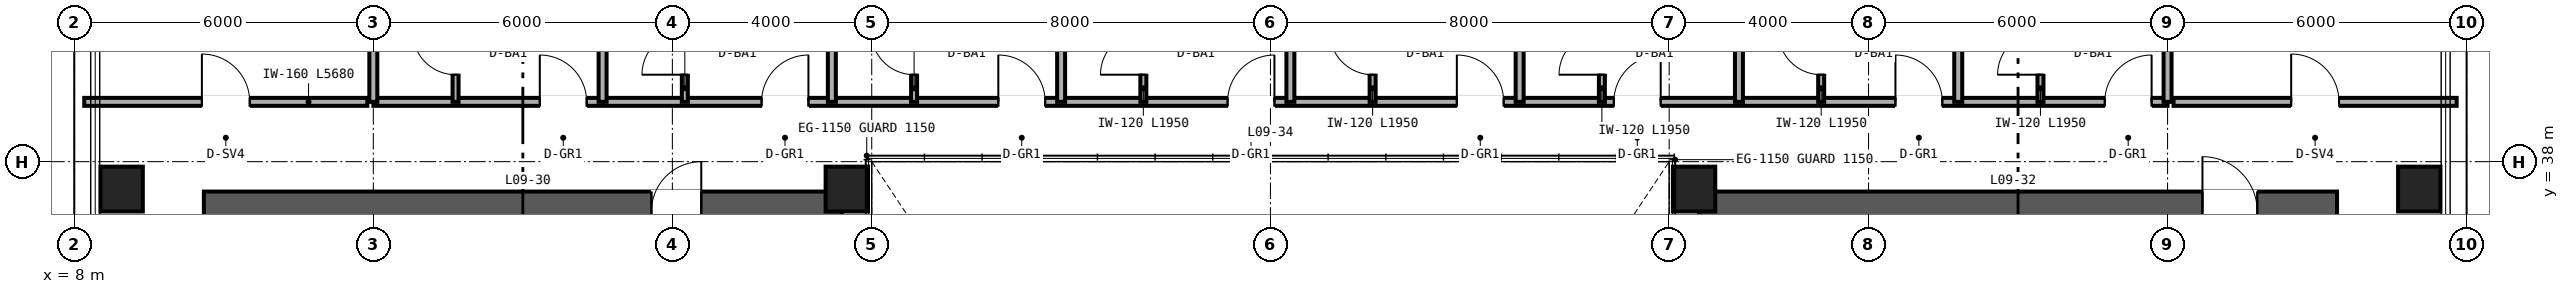
"""IFC4 building model, lengths in metres.
Left out: names, types, materials, properties, quantities, classifications, styles, units other than length and angle.
Written with IfcOpenShell. Run it as: python <this file> out.ifc"""

import sys

from ifc_helpers import new_model, si_unit, direction, frame, frame_2d, origin, origin_2d, place, context, subcontext, project, spatial, rectangle, hollow_rectangle, extrude, source, transform, mapped, element, fill, save


model = new_model("IFC4")
c1 = context("Model", 3, precision=1e-05, world=origin(), true_north=direction((0.0, 1.0)))
c2 = subcontext(c1, "Body", "Model", "MODEL_VIEW")
j1 = project(units=[si_unit("LENGTHUNIT", "METRE"), si_unit("PLANEANGLEUNIT", "RADIAN")], contexts=[c1])
p1 = place(None, origin())
s1 = spatial("IfcSite", under=j1, at=p1, CompositionType="ELEMENT")
p2 = place(p1, origin())
s2 = spatial("IfcBuilding", under=s1, at=p2, CompositionType="ELEMENT")
p3 = place(p2, frame((0.0, 0.0, 42.0)))
s3 = spatial("IfcBuildingStorey", under=s2, at=p3, CompositionType="ELEMENT", Elevation=42.0)
p4 = place(p3, frame((10.6, 37.0, 0.0), z_axis=(0.0, 0.0, 1.0), x_axis=(1.0, 0.0, 0.0)))
e1 = element("IfcWall", 1, at=p4, inside=s3, PredefinedType="SHEAR", context=c2, shape_type="SweptSolid", body=[
    extrude(rectangle(XDim=12.8, YDim=0.8, at=frame_2d((6.4, 0.0))), origin(), (0.0, 0.0, 1.0), 3.35),
])
p5 = place(p4, frame((8.98, 0.0, 0.0)))
e2 = element("IfcOpeningElement", 2, at=p5, cuts=e1, PredefinedType="OPENING", context=c2, shape_type="SweptSolid", body=[
    extrude(rectangle(XDim=1.0, YDim=2.15, at=frame_2d((0.5, 1.075))), frame((0.0, 0.41, 0.0), z_axis=(0.0, -1.0, 0.0), x_axis=(1.0, 0.0, 0.0)), (0.0, 0.0, 1.0), 0.82),
])
p6 = place(p3, frame((40.6, 37.0, 0.0), z_axis=(0.0, 0.0, 1.0), x_axis=(1.0, 0.0, 0.0)))
e3 = element("IfcWall", 3, at=p6, inside=s3, PredefinedType="SHEAR", context=c2, shape_type="SweptSolid", body=[
    extrude(rectangle(XDim=12.8, YDim=0.8, at=frame_2d((6.4, 0.0))), origin(), (0.0, 0.0, 1.0), 3.35),
])
p7 = place(p6, frame((10.1, 0.0, 0.0)))
e4 = element("IfcOpeningElement", 4, at=p7, cuts=e3, PredefinedType="OPENING", context=c2, shape_type="SweptSolid", body=[
    extrude(rectangle(XDim=1.1, YDim=2.15, at=frame_2d((0.55, 1.075))), frame((0.0, 0.41, 0.0), z_axis=(0.0, -1.0, 0.0), x_axis=(1.0, 0.0, 0.0)), (0.0, 0.0, 1.0), 0.82),
])
m1 = source(origin(), c2, "Body", "SweptSolid", [
    extrude(hollow_rectangle(XDim=0.85, YDim=0.9, WallThickness=0.04, at=origin_2d()), origin(), (0.0, 0.0, 1.0), 3.35),
])
for number, where, z_axis, x_axis in (
    (5, (8.95, 37.45, 0.0), (0.0, 0.0, 1.0), (1.0, 0.0, 0.0)),
    (6, (23.5, 37.45, 0.0), (0.0, 0.0, 1.0), (1.0, 0.0, 0.0)),
    (7, (40.5, 37.45, 0.0), (0.0, 0.0, 1.0), (1.0, 0.0, 0.0)),
    (8, (55.05, 37.45, 0.0), (0.0, 0.0, 1.0), (1.0, 0.0, 0.0)),
):
    element("IfcColumn", number, at=place(p3, frame(where, z_axis=z_axis, x_axis=x_axis)), inside=s3, PredefinedType="COLUMN", context=c2, shape_type="MappedRepresentation", body=[
        mapped(m1, transform((0.0, 0.0, 0.0), scale=1.0)),
    ])
p8 = place(p3, frame((8.2, 39.2, 0.0), z_axis=(0.0, 0.0, 1.0), x_axis=(1.0, 0.0, 0.0)))
e9 = element("IfcWall", 9, at=p8, inside=s3, PredefinedType="PARTITIONING", context=c2, shape_type="SweptSolid", body=[
    extrude(rectangle(XDim=5.68, YDim=0.16, at=frame_2d((2.84, 0.0))), origin(), (0.0, 0.0, 1.0), 3.35),
])
p9 = place(p8, frame((2.36, 0.0, 0.0)))
e10 = element("IfcOpeningElement", 10, at=p9, cuts=e9, PredefinedType="OPENING", context=c2, shape_type="SweptSolid", body=[
    extrude(rectangle(XDim=0.96, YDim=2.15, at=frame_2d((0.48, 1.075))), frame((0.0, 0.09, 0.0), z_axis=(0.0, -1.0, 0.0), x_axis=(1.0, 0.0, 0.0)), (0.0, 0.0, 1.0), 0.18),
])
p10 = place(p3, frame((50.12, 39.2, 0.0), z_axis=(0.0, 0.0, 1.0), x_axis=(1.0, 0.0, 0.0)))
e11 = element("IfcWall", 11, at=p10, inside=s3, PredefinedType="PARTITIONING", context=c2, shape_type="SweptSolid", body=[
    extrude(rectangle(XDim=5.68, YDim=0.16, at=frame_2d((2.84, 0.0))), origin(), (0.0, 0.0, 1.0), 3.35),
])
p11 = place(p10, frame((2.36, 0.0, 0.0)))
e12 = element("IfcOpeningElement", 12, at=p11, cuts=e11, PredefinedType="OPENING", context=c2, shape_type="SweptSolid", body=[
    extrude(rectangle(XDim=0.96, YDim=2.15, at=frame_2d((0.48, 1.075))), frame((0.0, 0.09, 0.0), z_axis=(0.0, -1.0, 0.0), x_axis=(1.0, 0.0, 0.0)), (0.0, 0.0, 1.0), 0.18),
])
p12 = place(p3, frame((14.0, 39.2, 0.0), z_axis=(0.0, 0.0, 1.0), x_axis=(1.0, 0.0, 0.0)))
e13 = element("IfcWall", 13, at=p12, inside=s3, PredefinedType="PARTITIONING", context=c2, shape_type="SweptSolid", body=[
    extrude(rectangle(XDim=36.0, YDim=0.16, at=frame_2d((18.0, 0.0))), origin(), (0.0, 0.0, 1.0), 2.571),
])
p13 = place(p12, frame((3.34, 0.0, 0.0)))
e14 = element("IfcOpeningElement", 14, at=p13, cuts=e13, PredefinedType="OPENING", context=c2, shape_type="SweptSolid", body=[
    extrude(rectangle(XDim=0.94, YDim=2.15, at=frame_2d((0.47, 1.075))), frame((0.0, 0.09, 0.0), z_axis=(0.0, -1.0, 0.0), x_axis=(1.0, 0.0, 0.0)), (0.0, 0.0, 1.0), 0.18),
])
p14 = place(p12, frame((7.79, 0.0, 0.0)))
e15 = element("IfcOpeningElement", 15, at=p14, cuts=e13, PredefinedType="OPENING", context=c2, shape_type="SweptSolid", body=[
    extrude(rectangle(XDim=0.94, YDim=2.15, at=frame_2d((0.47, 1.075))), frame((0.0, 0.09, 0.0), z_axis=(0.0, -1.0, 0.0), x_axis=(1.0, 0.0, 0.0)), (0.0, 0.0, 1.0), 0.18),
])
p15 = place(p12, frame((12.54, 0.0, 0.0)))
e16 = element("IfcOpeningElement", 16, at=p15, cuts=e13, PredefinedType="OPENING", context=c2, shape_type="SweptSolid", body=[
    extrude(rectangle(XDim=0.94, YDim=2.15, at=frame_2d((0.47, 1.075))), frame((0.0, 0.09, 0.0), z_axis=(0.0, -1.0, 0.0), x_axis=(1.0, 0.0, 0.0)), (0.0, 0.0, 1.0), 0.18),
])
p16 = place(p12, frame((17.14, 0.0, 0.0)))
e17 = element("IfcOpeningElement", 17, at=p16, cuts=e13, PredefinedType="OPENING", context=c2, shape_type="SweptSolid", body=[
    extrude(rectangle(XDim=0.94, YDim=2.15, at=frame_2d((0.47, 1.075))), frame((0.0, 0.09, 0.0), z_axis=(0.0, -1.0, 0.0), x_axis=(1.0, 0.0, 0.0)), (0.0, 0.0, 1.0), 0.18),
])
p17 = place(p12, frame((21.74, 0.0, 0.0)))
e18 = element("IfcOpeningElement", 18, at=p17, cuts=e13, PredefinedType="OPENING", context=c2, shape_type="SweptSolid", body=[
    extrude(rectangle(XDim=0.94, YDim=2.15, at=frame_2d((0.47, 1.075))), frame((0.0, 0.09, 0.0), z_axis=(0.0, -1.0, 0.0), x_axis=(1.0, 0.0, 0.0)), (0.0, 0.0, 1.0), 0.18),
])
p18 = place(p12, frame((24.89, 0.0, 0.0)))
e19 = element("IfcOpeningElement", 19, at=p18, cuts=e13, PredefinedType="OPENING", context=c2, shape_type="SweptSolid", body=[
    extrude(rectangle(XDim=0.94, YDim=2.15, at=frame_2d((0.47, 1.075))), frame((0.0, 0.09, 0.0), z_axis=(0.0, -1.0, 0.0), x_axis=(1.0, 0.0, 0.0)), (0.0, 0.0, 1.0), 0.18),
])
p19 = place(p12, frame((30.54, 0.0, 0.0)))
e20 = element("IfcOpeningElement", 20, at=p19, cuts=e13, PredefinedType="OPENING", context=c2, shape_type="SweptSolid", body=[
    extrude(rectangle(XDim=0.94, YDim=2.15, at=frame_2d((0.47, 1.075))), frame((0.0, 0.09, 0.0), z_axis=(0.0, -1.0, 0.0), x_axis=(1.0, 0.0, 0.0)), (0.0, 0.0, 1.0), 0.18),
])
p20 = place(p12, frame((34.74, 0.0, 0.0)))
e21 = element("IfcOpeningElement", 21, at=p20, cuts=e13, PredefinedType="OPENING", context=c2, shape_type="SweptSolid", body=[
    extrude(rectangle(XDim=0.94, YDim=2.15, at=frame_2d((0.47, 1.075))), frame((0.0, 0.09, 0.0), z_axis=(0.0, -1.0, 0.0), x_axis=(1.0, 0.0, 0.0)), (0.0, 0.0, 1.0), 0.18),
])
for number, where, z_axis, x_axis in (
    (22, (14.0, 39.2, 0.0), (0.0, 0.0, 1.0), (0.0, 1.0, 0.0)),
    (23, (50.0, 39.2, 0.0), (0.0, 0.0, 1.0), (0.0, 1.0, 0.0)),
    (24, (18.6, 39.2, 0.0), (0.0, 0.0, 1.0), (0.0, 1.0, 0.0)),
):
    element("IfcWall", number, at=place(p3, frame(where, z_axis=z_axis, x_axis=x_axis)), inside=s3, PredefinedType="PARTITIONING", context=c2, shape_type="SweptSolid", body=[
        extrude(rectangle(XDim=10.44, YDim=0.16, at=frame_2d((5.22, 0.0))), origin(), (0.0, 0.0, 1.0), 2.657),
    ])
p21 = place(p3, frame((15.65, 39.2, 0.0), z_axis=(0.0, 0.0, 1.0), x_axis=(0.0, 1.0, 0.0)))
e25 = element("IfcWall", 25, at=p21, inside=s3, PredefinedType="PARTITIONING", context=c2, shape_type="SweptSolid", body=[
    extrude(rectangle(XDim=1.95, YDim=0.12, at=frame_2d((0.975, 0.0))), origin(), (0.0, 0.0, 1.0), 3.35),
])
p22 = place(p21, frame((0.545, 0.0, 0.0)))
e26 = element("IfcOpeningElement", 26, at=p22, cuts=e25, PredefinedType="OPENING", context=c2, shape_type="SweptSolid", body=[
    extrude(rectangle(XDim=0.86, YDim=2.1, at=frame_2d((0.43, 1.05))), frame((0.0, 0.07, 0.0), z_axis=(0.0, -1.0, 0.0), x_axis=(1.0, 0.0, 0.0)), (0.0, 0.0, 1.0), 0.14),
])
p23 = place(p3, frame((23.2, 39.2, 0.0), z_axis=(0.0, 0.0, 1.0), x_axis=(0.0, 1.0, 0.0)))
e27 = element("IfcWall", 27, at=p23, inside=s3, PredefinedType="PARTITIONING", context=c2, shape_type="SweptSolid", body=[
    extrude(rectangle(XDim=10.44, YDim=0.16, at=frame_2d((5.22, 0.0))), origin(), (0.0, 0.0, 1.0), 2.813),
])
p24 = place(p3, frame((20.25, 39.2, 0.0), z_axis=(0.0, 0.0, 1.0), x_axis=(0.0, 1.0, 0.0)))
e28 = element("IfcWall", 28, at=p24, inside=s3, PredefinedType="PARTITIONING", context=c2, shape_type="SweptSolid", body=[
    extrude(rectangle(XDim=1.95, YDim=0.12, at=frame_2d((0.975, 0.0))), origin(), (0.0, 0.0, 1.0), 3.35),
])
p25 = place(p24, frame((0.545, 0.0, 0.0)))
e29 = element("IfcOpeningElement", 29, at=p25, cuts=e28, PredefinedType="OPENING", context=c2, shape_type="SweptSolid", body=[
    extrude(rectangle(XDim=0.86, YDim=2.1, at=frame_2d((0.43, 1.05))), frame((0.0, 0.07, 0.0), z_axis=(0.0, -1.0, 0.0), x_axis=(1.0, 0.0, 0.0)), (0.0, 0.0, 1.0), 0.14),
])
p26 = place(p3, frame((27.8, 39.2, 0.0), z_axis=(0.0, 0.0, 1.0), x_axis=(0.0, 1.0, 0.0)))
e30 = element("IfcWall", 30, at=p26, inside=s3, PredefinedType="PARTITIONING", context=c2, shape_type="SweptSolid", body=[
    extrude(rectangle(XDim=10.44, YDim=0.16, at=frame_2d((5.22, 0.0))), origin(), (0.0, 0.0, 1.0), 2.423),
])
p27 = place(p3, frame((24.85, 39.2, 0.0), z_axis=(0.0, 0.0, 1.0), x_axis=(0.0, 1.0, 0.0)))
e31 = element("IfcWall", 31, at=p27, inside=s3, PredefinedType="PARTITIONING", context=c2, shape_type="SweptSolid", body=[
    extrude(rectangle(XDim=1.95, YDim=0.12, at=frame_2d((0.975, 0.0))), origin(), (0.0, 0.0, 1.0), 3.35),
])
p28 = place(p27, frame((0.545, 0.0, 0.0)))
e32 = element("IfcOpeningElement", 32, at=p28, cuts=e31, PredefinedType="OPENING", context=c2, shape_type="SweptSolid", body=[
    extrude(rectangle(XDim=0.86, YDim=2.1, at=frame_2d((0.43, 1.05))), frame((0.0, 0.07, 0.0), z_axis=(0.0, -1.0, 0.0), x_axis=(1.0, 0.0, 0.0)), (0.0, 0.0, 1.0), 0.14),
])
p29 = place(p3, frame((32.4, 39.2, 0.0), z_axis=(0.0, 0.0, 1.0), x_axis=(0.0, 1.0, 0.0)))
e33 = element("IfcWall", 33, at=p29, inside=s3, PredefinedType="PARTITIONING", context=c2, shape_type="SweptSolid", body=[
    extrude(rectangle(XDim=10.44, YDim=0.16, at=frame_2d((5.22, 0.0))), origin(), (0.0, 0.0, 1.0), 2.423),
])
p30 = place(p3, frame((29.45, 39.2, 0.0), z_axis=(0.0, 0.0, 1.0), x_axis=(0.0, 1.0, 0.0)))
e34 = element("IfcWall", 34, at=p30, inside=s3, PredefinedType="PARTITIONING", context=c2, shape_type="SweptSolid", body=[
    extrude(rectangle(XDim=1.95, YDim=0.12, at=frame_2d((0.975, 0.0))), origin(), (0.0, 0.0, 1.0), 3.35),
])
p31 = place(p30, frame((0.545, 0.0, 0.0)))
e35 = element("IfcOpeningElement", 35, at=p31, cuts=e34, PredefinedType="OPENING", context=c2, shape_type="SweptSolid", body=[
    extrude(rectangle(XDim=0.86, YDim=2.1, at=frame_2d((0.43, 1.05))), frame((0.0, 0.07, 0.0), z_axis=(0.0, -1.0, 0.0), x_axis=(1.0, 0.0, 0.0)), (0.0, 0.0, 1.0), 0.14),
])
p32 = place(p3, frame((37.0, 39.2, 0.0), z_axis=(0.0, 0.0, 1.0), x_axis=(0.0, 1.0, 0.0)))
e36 = element("IfcWall", 36, at=p32, inside=s3, PredefinedType="PARTITIONING", context=c2, shape_type="SweptSolid", body=[
    extrude(rectangle(XDim=10.44, YDim=0.16, at=frame_2d((5.22, 0.0))), origin(), (0.0, 0.0, 1.0), 2.423),
])
p33 = place(p3, frame((34.05, 39.2, 0.0), z_axis=(0.0, 0.0, 1.0), x_axis=(0.0, 1.0, 0.0)))
e37 = element("IfcWall", 37, at=p33, inside=s3, PredefinedType="PARTITIONING", context=c2, shape_type="SweptSolid", body=[
    extrude(rectangle(XDim=1.95, YDim=0.12, at=frame_2d((0.975, 0.0))), origin(), (0.0, 0.0, 1.0), 3.35),
])
p34 = place(p33, frame((0.545, 0.0, 0.0)))
e38 = element("IfcOpeningElement", 38, at=p34, cuts=e37, PredefinedType="OPENING", context=c2, shape_type="SweptSolid", body=[
    extrude(rectangle(XDim=0.86, YDim=2.1, at=frame_2d((0.43, 1.05))), frame((0.0, 0.07, 0.0), z_axis=(0.0, -1.0, 0.0), x_axis=(1.0, 0.0, 0.0)), (0.0, 0.0, 1.0), 0.14),
])
p35 = place(p3, frame((41.4, 39.2, 0.0), z_axis=(0.0, 0.0, 1.0), x_axis=(0.0, 1.0, 0.0)))
e39 = element("IfcWall", 39, at=p35, inside=s3, PredefinedType="PARTITIONING", context=c2, shape_type="SweptSolid", body=[
    extrude(rectangle(XDim=10.44, YDim=0.16, at=frame_2d((5.22, 0.0))), origin(), (0.0, 0.0, 1.0), 2.813),
])
p36 = place(p3, frame((38.65, 39.2, 0.0), z_axis=(0.0, 0.0, 1.0), x_axis=(0.0, 1.0, 0.0)))
e40 = element("IfcWall", 40, at=p36, inside=s3, PredefinedType="PARTITIONING", context=c2, shape_type="SweptSolid", body=[
    extrude(rectangle(XDim=1.95, YDim=0.12, at=frame_2d((0.975, 0.0))), origin(), (0.0, 0.0, 1.0), 3.35),
])
p37 = place(p36, frame((0.545, 0.0, 0.0)))
e41 = element("IfcOpeningElement", 41, at=p37, cuts=e40, PredefinedType="OPENING", context=c2, shape_type="SweptSolid", body=[
    extrude(rectangle(XDim=0.86, YDim=2.1, at=frame_2d((0.43, 1.05))), frame((0.0, 0.07, 0.0), z_axis=(0.0, -1.0, 0.0), x_axis=(1.0, 0.0, 0.0)), (0.0, 0.0, 1.0), 0.14),
])
p38 = place(p3, frame((45.8, 39.2, 0.0), z_axis=(0.0, 0.0, 1.0), x_axis=(0.0, 1.0, 0.0)))
e42 = element("IfcWall", 42, at=p38, inside=s3, PredefinedType="PARTITIONING", context=c2, shape_type="SweptSolid", body=[
    extrude(rectangle(XDim=10.44, YDim=0.16, at=frame_2d((5.22, 0.0))), origin(), (0.0, 0.0, 1.0), 2.657),
])
p39 = place(p3, frame((43.05, 39.2, 0.0), z_axis=(0.0, 0.0, 1.0), x_axis=(0.0, 1.0, 0.0)))
e43 = element("IfcWall", 43, at=p39, inside=s3, PredefinedType="PARTITIONING", context=c2, shape_type="SweptSolid", body=[
    extrude(rectangle(XDim=1.95, YDim=0.12, at=frame_2d((0.975, 0.0))), origin(), (0.0, 0.0, 1.0), 3.35),
])
p40 = place(p39, frame((0.545, 0.0, 0.0)))
e44 = element("IfcOpeningElement", 44, at=p40, cuts=e43, PredefinedType="OPENING", context=c2, shape_type="SweptSolid", body=[
    extrude(rectangle(XDim=0.86, YDim=2.1, at=frame_2d((0.43, 1.05))), frame((0.0, 0.07, 0.0), z_axis=(0.0, -1.0, 0.0), x_axis=(1.0, 0.0, 0.0)), (0.0, 0.0, 1.0), 0.14),
])
p41 = place(p3, frame((47.45, 39.2, 0.0), z_axis=(0.0, 0.0, 1.0), x_axis=(0.0, 1.0, 0.0)))
e45 = element("IfcWall", 45, at=p41, inside=s3, PredefinedType="PARTITIONING", context=c2, shape_type="SweptSolid", body=[
    extrude(rectangle(XDim=1.95, YDim=0.12, at=frame_2d((0.975, 0.0))), origin(), (0.0, 0.0, 1.0), 3.35),
])
p42 = place(p41, frame((0.545, 0.0, 0.0)))
e46 = element("IfcOpeningElement", 46, at=p42, cuts=e45, PredefinedType="OPENING", context=c2, shape_type="SweptSolid", body=[
    extrude(rectangle(XDim=0.86, YDim=2.1, at=frame_2d((0.43, 1.05))), frame((0.0, 0.07, 0.0), z_axis=(0.0, -1.0, 0.0), x_axis=(1.0, 0.0, 0.0)), (0.0, 0.0, 1.0), 0.14),
])
m2 = source(origin(), c2, "Body", "SweptSolid", [
    extrude(rectangle(XDim=1.0, YDim=2.15, at=frame_2d((0.5, 1.075))), frame((0.0, 0.025, 0.0), z_axis=(0.0, -1.0, 0.0), x_axis=(1.0, 0.0, 0.0)), (0.0, 0.0, 1.0), 0.05),
])
p43 = place(p5, origin())
e47 = element("IfcDoor", 47, at=p43, inside=s3, OperationType="SINGLE_SWING_RIGHT", PredefinedType="DOOR", context=c2, shape_type="MappedRepresentation", body=[
    mapped(m2, transform((0.0, 0.0, 0.0), scale=1.0)),
])
fill(e2, e47)
m3 = source(origin(), c2, "Body", "SweptSolid", [
    extrude(rectangle(XDim=1.1, YDim=2.15, at=frame_2d((0.55, 1.075))), frame((0.0, 0.025, 0.0), z_axis=(0.0, -1.0, 0.0), x_axis=(1.0, 0.0, 0.0)), (0.0, 0.0, 1.0), 0.05),
])
p44 = place(p7, origin())
e48 = element("IfcDoor", 48, at=p44, inside=s3, OperationType="SINGLE_SWING_LEFT", PredefinedType="DOOR", context=c2, shape_type="MappedRepresentation", body=[
    mapped(m3, transform((0.0, 0.0, 0.0), scale=1.0)),
])
fill(e4, e48)
m4 = source(origin(), c2, "Body", "SweptSolid", [
    extrude(rectangle(XDim=0.96, YDim=2.15, at=frame_2d((0.48, 1.075))), frame((0.0, 0.025, 0.0), z_axis=(0.0, -1.0, 0.0), x_axis=(1.0, 0.0, 0.0)), (0.0, 0.0, 1.0), 0.05),
])
p45 = place(p9, origin())
e49 = element("IfcDoor", 49, at=p45, inside=s3, OperationType="SINGLE_SWING_LEFT", PredefinedType="DOOR", context=c2, shape_type="MappedRepresentation", body=[
    mapped(m4, transform((0.0, 0.0, 0.0), scale=1.0)),
])
fill(e10, e49)
p46 = place(p11, origin())
e50 = element("IfcDoor", 50, at=p46, inside=s3, OperationType="SINGLE_SWING_LEFT", PredefinedType="DOOR", context=c2, shape_type="MappedRepresentation", body=[
    mapped(m4, transform((0.0, 0.0, 0.0), scale=1.0)),
])
fill(e12, e50)
m5 = source(origin(), c2, "Body", "SweptSolid", [
    extrude(rectangle(XDim=0.86, YDim=2.1, at=frame_2d((0.43, 1.05))), frame((0.0, 0.025, 0.0), z_axis=(0.0, -1.0, 0.0), x_axis=(1.0, 0.0, 0.0)), (0.0, 0.0, 1.0), 0.05),
])
p47 = place(p22, origin())
e51 = element("IfcDoor", 51, at=p47, inside=s3, OperationType="SINGLE_SWING_RIGHT", PredefinedType="DOOR", context=c2, shape_type="MappedRepresentation", body=[
    mapped(m5, transform((0.0, 0.0, 0.0), scale=1.0)),
])
fill(e26, e51)
p48 = place(p25, origin())
e52 = element("IfcDoor", 52, at=p48, inside=s3, OperationType="SINGLE_SWING_LEFT", PredefinedType="DOOR", context=c2, shape_type="MappedRepresentation", body=[
    mapped(m5, transform((0.0, 0.0, 0.0), scale=1.0)),
])
fill(e29, e52)
p49 = place(p28, origin())
e53 = element("IfcDoor", 53, at=p49, inside=s3, OperationType="SINGLE_SWING_RIGHT", PredefinedType="DOOR", context=c2, shape_type="MappedRepresentation", body=[
    mapped(m5, transform((0.0, 0.0, 0.0), scale=1.0)),
])
fill(e32, e53)
p50 = place(p31, origin())
e54 = element("IfcDoor", 54, at=p50, inside=s3, OperationType="SINGLE_SWING_LEFT", PredefinedType="DOOR", context=c2, shape_type="MappedRepresentation", body=[
    mapped(m5, transform((0.0, 0.0, 0.0), scale=1.0)),
])
fill(e35, e54)
p51 = place(p34, origin())
e55 = element("IfcDoor", 55, at=p51, inside=s3, OperationType="SINGLE_SWING_RIGHT", PredefinedType="DOOR", context=c2, shape_type="MappedRepresentation", body=[
    mapped(m5, transform((0.0, 0.0, 0.0), scale=1.0)),
])
fill(e38, e55)
p52 = place(p37, origin())
e56 = element("IfcDoor", 56, at=p52, inside=s3, OperationType="SINGLE_SWING_LEFT", PredefinedType="DOOR", context=c2, shape_type="MappedRepresentation", body=[
    mapped(m5, transform((0.0, 0.0, 0.0), scale=1.0)),
])
fill(e41, e56)
p53 = place(p40, origin())
e57 = element("IfcDoor", 57, at=p53, inside=s3, OperationType="SINGLE_SWING_RIGHT", PredefinedType="DOOR", context=c2, shape_type="MappedRepresentation", body=[
    mapped(m5, transform((0.0, 0.0, 0.0), scale=1.0)),
])
fill(e44, e57)
p54 = place(p42, origin())
e58 = element("IfcDoor", 58, at=p54, inside=s3, OperationType="SINGLE_SWING_LEFT", PredefinedType="DOOR", context=c2, shape_type="MappedRepresentation", body=[
    mapped(m5, transform((0.0, 0.0, 0.0), scale=1.0)),
])
fill(e46, e58)
m6 = source(origin(), c2, "Body", "SweptSolid", [
    extrude(rectangle(XDim=0.94, YDim=2.15, at=frame_2d((0.47, 1.075))), frame((0.0, 0.025, 0.0), z_axis=(0.0, -1.0, 0.0), x_axis=(1.0, 0.0, 0.0)), (0.0, 0.0, 1.0), 0.05),
])
p55 = place(p13, origin())
e59 = element("IfcDoor", 59, at=p55, inside=s3, OperationType="SINGLE_SWING_LEFT", PredefinedType="DOOR", context=c2, shape_type="MappedRepresentation", body=[
    mapped(m6, transform((0.0, 0.0, 0.0), scale=1.0)),
])
fill(e14, e59)
p56 = place(p14, origin())
e60 = element("IfcDoor", 60, at=p56, inside=s3, OperationType="SINGLE_SWING_RIGHT", PredefinedType="DOOR", context=c2, shape_type="MappedRepresentation", body=[
    mapped(m6, transform((0.0, 0.0, 0.0), scale=1.0)),
])
fill(e15, e60)
p57 = place(p15, origin())
e61 = element("IfcDoor", 61, at=p57, inside=s3, OperationType="SINGLE_SWING_LEFT", PredefinedType="DOOR", context=c2, shape_type="MappedRepresentation", body=[
    mapped(m6, transform((0.0, 0.0, 0.0), scale=1.0)),
])
fill(e16, e61)
p58 = place(p16, origin())
e62 = element("IfcDoor", 62, at=p58, inside=s3, OperationType="SINGLE_SWING_RIGHT", PredefinedType="DOOR", context=c2, shape_type="MappedRepresentation", body=[
    mapped(m6, transform((0.0, 0.0, 0.0), scale=1.0)),
])
fill(e17, e62)
p59 = place(p17, origin())
e63 = element("IfcDoor", 63, at=p59, inside=s3, OperationType="SINGLE_SWING_LEFT", PredefinedType="DOOR", context=c2, shape_type="MappedRepresentation", body=[
    mapped(m6, transform((0.0, 0.0, 0.0), scale=1.0)),
])
fill(e18, e63)
p60 = place(p18, origin())
e64 = element("IfcDoor", 64, at=p60, inside=s3, OperationType="SINGLE_SWING_RIGHT", PredefinedType="DOOR", context=c2, shape_type="MappedRepresentation", body=[
    mapped(m6, transform((0.0, 0.0, 0.0), scale=1.0)),
])
fill(e19, e64)
p61 = place(p19, origin())
e65 = element("IfcDoor", 65, at=p61, inside=s3, OperationType="SINGLE_SWING_LEFT", PredefinedType="DOOR", context=c2, shape_type="MappedRepresentation", body=[
    mapped(m6, transform((0.0, 0.0, 0.0), scale=1.0)),
])
fill(e20, e65)
p62 = place(p20, origin())
e66 = element("IfcDoor", 66, at=p62, inside=s3, OperationType="SINGLE_SWING_RIGHT", PredefinedType="DOOR", context=c2, shape_type="MappedRepresentation", body=[
    mapped(m6, transform((0.0, 0.0, 0.0), scale=1.0)),
])
fill(e21, e66)
save(model, sys.argv[1])
